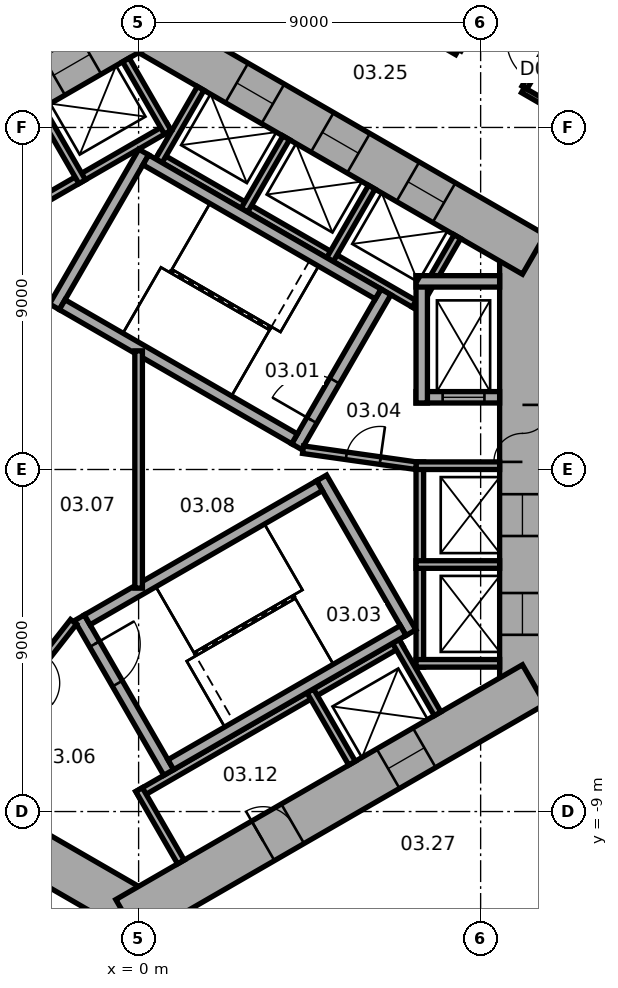
"""IFC4 building model, lengths in metres.
Left out: names, types, materials, properties, quantities, classifications, styles, units other than length and angle.
Written with IfcOpenShell. Run it as: python <this file> out.ifc"""

import sys

from ifc_helpers import new_model, si_unit, direction, frame, frame_2d, origin, place, context, subcontext, project, spatial, rectangle, extrude, element, fill, save


model = new_model("IFC4")
c1 = context("Model", 3, precision=1e-05, world=origin(), true_north=direction((0.0, 1.0)))
c2 = subcontext(c1, "Body", "Model", "MODEL_VIEW")
j1 = project(units=[si_unit("LENGTHUNIT", "METRE"), si_unit("PLANEANGLEUNIT", "RADIAN")], contexts=[c1])
p1 = place(None, origin())
s1 = spatial("IfcSite", under=j1, at=p1, CompositionType="ELEMENT")
p2 = place(p1, origin())
s2 = spatial("IfcBuilding", under=s1, at=p2, CompositionType="ELEMENT")
p3 = place(p2, frame((0.0, 0.0, 21.0)))
s3 = spatial("IfcBuildingStorey", under=s2, at=p3, CompositionType="ELEMENT", Elevation=21.0)
p4 = place(p3, frame((10.1, -6.177, 0.0), z_axis=(0.0, 0.0, 1.0), x_axis=(0.0, 1.0, 0.0)))
e1 = element("IfcWall", 1, at=p4, inside=s3, PredefinedType="SHEAR", context=c2, shape_type="SweptSolid", body=[
    extrude(rectangle(XDim=12.355, YDim=1.2, at=frame_2d((6.177, 0.0))), origin(), (0.0, 0.0, 1.0), 8.0),
])
p5 = place(p4, frame((6.378, 0.0, 0.0)))
e2 = element("IfcOpeningElement", 2, at=p5, cuts=e1, PredefinedType="OPENING", context=c2, shape_type="SweptSolid", body=[
    extrude(rectangle(XDim=1.5, YDim=2.1, at=frame_2d((0.75, 1.05))), frame((0.0, 0.61, 0.0), z_axis=(0.0, -1.0, 0.0), x_axis=(1.0, 0.0, 0.0)), (0.0, 0.0, 1.0), 1.22),
])
p6 = place(p4, frame((1.828, 0.0, 0.0)))
e3 = element("IfcOpeningElement", 3, at=p6, cuts=e1, PredefinedType="OPENING", context=c2, shape_type="SweptSolid", body=[
    extrude(rectangle(XDim=1.1, YDim=2.1, at=frame_2d((0.55, 1.05))), frame((0.0, 0.61, 0.0), z_axis=(0.0, -1.0, 0.0), x_axis=(1.0, 0.0, 0.0)), (0.0, 0.0, 1.0), 1.22),
])
p7 = place(p4, frame((4.427, 0.0, 0.0)))
e4 = element("IfcOpeningElement", 4, at=p7, cuts=e1, PredefinedType="OPENING", context=c2, shape_type="SweptSolid", body=[
    extrude(rectangle(XDim=1.1, YDim=2.1, at=frame_2d((0.55, 1.05))), frame((0.0, 0.61, 0.0), z_axis=(0.0, -1.0, 0.0), x_axis=(1.0, 0.0, 0.0)), (0.0, 0.0, 1.0), 1.22),
])
p8 = place(p3, frame((10.4, 5.658, 0.0), z_axis=(0.0, 0.0, 1.0), x_axis=(-0.866021384402, 0.500006961711, 0.0)))
e5 = element("IfcWall", 5, at=p8, inside=s3, PredefinedType="SHEAR", context=c2, shape_type="SweptSolid", body=[
    extrude(rectangle(XDim=12.355, YDim=1.2, at=frame_2d((6.178, 0.0))), origin(), (0.0, 0.0, 1.0), 8.0),
])
p9 = place(p8, frame((2.728, 0.0, 0.0)))
e6 = element("IfcOpeningElement", 6, at=p9, cuts=e5, PredefinedType="OPENING", context=c2, shape_type="SweptSolid", body=[
    extrude(rectangle(XDim=1.1, YDim=2.1, at=frame_2d((0.55, 1.05))), frame((0.0, 0.61, 0.0), z_axis=(0.0, -1.0, 0.0), x_axis=(1.0, 0.0, 0.0)), (0.0, 0.0, 1.0), 1.22),
])
p10 = place(p8, frame((5.328, 0.0, 0.0)))
e7 = element("IfcOpeningElement", 7, at=p10, cuts=e5, PredefinedType="OPENING", context=c2, shape_type="SweptSolid", body=[
    extrude(rectangle(XDim=1.1, YDim=2.1, at=frame_2d((0.55, 1.05))), frame((0.0, 0.61, 0.0), z_axis=(0.0, -1.0, 0.0), x_axis=(1.0, 0.0, 0.0)), (0.0, 0.0, 1.0), 1.22),
])
p11 = place(p8, frame((7.928, 0.0, 0.0)))
e8 = element("IfcOpeningElement", 8, at=p11, cuts=e5, PredefinedType="OPENING", context=c2, shape_type="SweptSolid", body=[
    extrude(rectangle(XDim=1.1, YDim=2.1, at=frame_2d((0.55, 1.05))), frame((0.0, 0.61, 0.0), z_axis=(0.0, -1.0, 0.0), x_axis=(1.0, 0.0, 0.0)), (0.0, 0.0, 1.0), 1.22),
])
p12 = place(p3, frame((0.3, 11.836, 0.0), z_axis=(0.0, 0.0, 1.0), x_axis=(-0.866021384402, -0.500006961711, 0.0)))
e9 = element("IfcWall", 9, at=p12, inside=s3, PredefinedType="SHEAR", context=c2, shape_type="SweptSolid", body=[
    extrude(rectangle(XDim=12.355, YDim=1.2, at=frame_2d((6.178, 0.0))), origin(), (0.0, 0.0, 1.0), 8.0),
])
p13 = place(p12, frame((6.378, 0.0, 0.0)))
e10 = element("IfcOpeningElement", 10, at=p13, cuts=e9, PredefinedType="OPENING", context=c2, shape_type="SweptSolid", body=[
    extrude(rectangle(XDim=1.5, YDim=2.1, at=frame_2d((0.75, 1.05))), frame((0.0, 0.61, 0.0), z_axis=(0.0, -1.0, 0.0), x_axis=(1.0, 0.0, 0.0)), (0.0, 0.0, 1.0), 1.22),
])
p14 = place(p12, frame((1.828, 0.0, 0.0)))
e11 = element("IfcOpeningElement", 11, at=p14, cuts=e9, PredefinedType="OPENING", context=c2, shape_type="SweptSolid", body=[
    extrude(rectangle(XDim=1.1, YDim=2.1, at=frame_2d((0.55, 1.05))), frame((0.0, 0.61, 0.0), z_axis=(0.0, -1.0, 0.0), x_axis=(1.0, 0.0, 0.0)), (0.0, 0.0, 1.0), 1.22),
])
p15 = place(p3, frame((-10.4, -5.658, 0.0), z_axis=(0.0, 0.0, 1.0), x_axis=(0.866021384402, -0.500006961711, 0.0)))
e12 = element("IfcWall", 12, at=p15, inside=s3, PredefinedType="SHEAR", context=c2, shape_type="SweptSolid", body=[
    extrude(rectangle(XDim=12.355, YDim=1.2, at=frame_2d((6.178, 0.0))), origin(), (0.0, 0.0, 1.0), 8.0),
])
p16 = place(p15, frame((6.378, 0.0, 0.0)))
e13 = element("IfcOpeningElement", 13, at=p16, cuts=e12, PredefinedType="OPENING", context=c2, shape_type="SweptSolid", body=[
    extrude(rectangle(XDim=1.5, YDim=2.1, at=frame_2d((0.75, 1.05))), frame((0.0, 0.61, 0.0), z_axis=(0.0, -1.0, 0.0), x_axis=(1.0, 0.0, 0.0)), (0.0, 0.0, 1.0), 1.22),
])
p17 = place(p15, frame((3.228, 0.0, 0.0)))
e14 = element("IfcOpeningElement", 14, at=p17, cuts=e12, PredefinedType="OPENING", context=c2, shape_type="SweptSolid", body=[
    extrude(rectangle(XDim=0.9, YDim=2.1, at=frame_2d((0.45, 1.05))), frame((0.0, 0.61, 0.0), z_axis=(0.0, -1.0, 0.0), x_axis=(1.0, 0.0, 0.0)), (0.0, 0.0, 1.0), 1.22),
])
p18 = place(p3, frame((-0.3, -11.836, 0.0), z_axis=(0.0, 0.0, 1.0), x_axis=(0.866021384402, 0.500006961711, 0.0)))
e15 = element("IfcWall", 15, at=p18, inside=s3, PredefinedType="SHEAR", context=c2, shape_type="SweptSolid", body=[
    extrude(rectangle(XDim=12.355, YDim=1.2, at=frame_2d((6.178, 0.0))), origin(), (0.0, 0.0, 1.0), 8.0),
])
p19 = place(p18, frame((4.128, 0.0, 0.0)))
e16 = element("IfcOpeningElement", 16, at=p19, cuts=e15, PredefinedType="OPENING", context=c2, shape_type="SweptSolid", body=[
    extrude(rectangle(XDim=0.9, YDim=2.1, at=frame_2d((0.45, 1.05))), frame((0.0, 0.61, 0.0), z_axis=(0.0, -1.0, 0.0), x_axis=(1.0, 0.0, 0.0)), (0.0, 0.0, 1.0), 1.22),
])
p20 = place(p18, frame((7.928, 0.0, 0.0)))
e17 = element("IfcOpeningElement", 17, at=p20, cuts=e15, PredefinedType="OPENING", context=c2, shape_type="SweptSolid", body=[
    extrude(rectangle(XDim=1.1, YDim=2.1, at=frame_2d((0.55, 1.05))), frame((0.0, 0.61, 0.0), z_axis=(0.0, -1.0, 0.0), x_axis=(1.0, 0.0, 0.0)), (0.0, 0.0, 1.0), 1.22),
])
p21 = place(p3, frame((7.4, -5.2, 0.0), z_axis=(0.0, 0.0, 1.0), x_axis=(0.0, 1.0, 0.0)))
e18 = element("IfcWall", 18, at=p21, inside=s3, PredefinedType="PARTITIONING", context=c2, shape_type="SweptSolid", body=[
    extrude(rectangle(XDim=5.4, YDim=0.2, at=frame_2d((2.7, 0.0))), origin(), (0.0, 0.0, 1.0), 7.7),
])
for number, where, z_axis, x_axis in (
    (19, (7.3, -5.1, 0.0), (0.0, 0.0, 1.0), (1.0, 0.0, 0.0)),
    (20, (7.3, -2.5, 0.0), (0.0, 0.0, 1.0), (1.0, 0.0, 0.0)),
    (21, (7.3, 0.1, 0.0), (0.0, 0.0, 1.0), (1.0, 0.0, 0.0)),
):
    element("IfcWall", number, at=place(p3, frame(where, z_axis=z_axis, x_axis=x_axis)), inside=s3, PredefinedType="PARTITIONING", context=c2, shape_type="SweptSolid", body=[
        extrude(rectangle(XDim=2.2, YDim=0.2, at=frame_2d((1.1, 0.0))), origin(), (0.0, 0.0, 1.0), 7.7),
    ])
p22 = place(p3, frame((7.424, 4.259, 0.0), z_axis=(0.0, 0.0, 1.0), x_axis=(-0.866026010844, 0.49999894854, 0.0)))
e22 = element("IfcWall", 22, at=p22, inside=s3, PredefinedType="PARTITIONING", context=c2, shape_type="SweptSolid", body=[
    extrude(rectangle(XDim=8.0, YDim=0.2, at=frame_2d((4.0, 0.0))), origin(), (0.0, 0.0, 1.0), 7.7),
])
for number, where, z_axis, x_axis in (
    (23, (7.287, 4.222, 0.0), (0.0, 0.0, 1.0), (0.5, 0.866, 0.0)),
    (24, (5.036, 5.522, 0.0), (0.0, 0.0, 1.0), (0.5, 0.866, 0.0)),
    (25, (2.784, 6.822, 0.0), (0.0, 0.0, 1.0), (0.5, 0.866, 0.0)),
    (26, (0.532, 8.122, 0.0), (0.0, 0.0, 1.0), (0.5, 0.866, 0.0)),
):
    element("IfcWall", number, at=place(p3, frame(where, z_axis=z_axis, x_axis=x_axis)), inside=s3, PredefinedType="PARTITIONING", context=c2, shape_type="SweptSolid", body=[
        extrude(rectangle(XDim=2.2, YDim=0.2, at=frame_2d((1.1, 0.0))), origin(), (0.0, 0.0, 1.0), 7.7),
    ])
p23 = place(p3, frame((0.803, 9.009, 0.0), z_axis=(0.0, 0.0, 1.0), x_axis=(-0.866028230842, -0.499995103361, 0.0)))
e27 = element("IfcWall", 27, at=p23, inside=s3, PredefinedType="PARTITIONING", context=c2, shape_type="SweptSolid", body=[
    extrude(rectangle(XDim=5.4, YDim=0.2, at=frame_2d((2.7, 0.0))), origin(), (0.0, 0.0, 1.0), 7.7),
])
p24 = place(p3, frame((0.767, 8.872, 0.0), z_axis=(0.0, 0.0, 1.0), x_axis=(-0.499994660107, 0.866028486751, 0.0)))
e28 = element("IfcWall", 28, at=p24, inside=s3, PredefinedType="PARTITIONING", context=c2, shape_type="SweptSolid", body=[
    extrude(rectangle(XDim=2.2, YDim=0.2, at=frame_2d((1.1, 0.0))), origin(), (0.0, 0.0, 1.0), 7.7),
])
p25 = place(p3, frame((-1.485, 7.572, 0.0), z_axis=(0.0, 0.0, 1.0), x_axis=(-0.50002983664, 0.866008176907, 0.0)))
e29 = element("IfcWall", 29, at=p25, inside=s3, PredefinedType="PARTITIONING", context=c2, shape_type="SweptSolid", body=[
    extrude(rectangle(XDim=2.2, YDim=0.2, at=frame_2d((1.1, 0.0))), origin(), (0.0, 0.0, 1.0), 7.7),
])
p26 = place(p3, frame((-0.024, -8.559, 0.0), z_axis=(0.0, 0.0, 1.0), x_axis=(0.866026010844, 0.49999894854, 0.0)))
e30 = element("IfcWall", 30, at=p26, inside=s3, PredefinedType="PARTITIONING", context=c2, shape_type="SweptSolid", body=[
    extrude(rectangle(XDim=8.0, YDim=0.2, at=frame_2d((4.0, 0.0))), origin(), (0.0, 0.0, 1.0), 7.7),
])
for number, where, z_axis, x_axis in (
    (31, (0.013, -8.422, 0.0), (0.0, 0.0, 1.0), (0.5, -0.866, 0.0)),
    (32, (4.516, -5.822, 0.0), (0.0, 0.0, 1.0), (0.5, -0.866, 0.0)),
    (33, (6.768, -4.522, 0.0), (0.0, 0.0, 1.0), (0.5, -0.866, 0.0)),
):
    element("IfcWall", number, at=place(p3, frame(where, z_axis=z_axis, x_axis=x_axis)), inside=s3, PredefinedType="PARTITIONING", context=c2, shape_type="SweptSolid", body=[
        extrude(rectangle(XDim=2.2, YDim=0.2, at=frame_2d((1.1, 0.0))), origin(), (0.0, 0.0, 1.0), 7.7),
    ])
p27 = place(p3, frame((4.158, 0.602, 0.0), z_axis=(0.0, 0.0, 1.0), x_axis=(0.499977259774, 0.866038532462, 0.0)))
e34 = element("IfcWall", 34, at=p27, inside=s3, PredefinedType="SHEAR", context=c2, shape_type="SweptSolid", body=[
    extrude(rectangle(XDim=4.7, YDim=0.3, at=frame_2d((2.35, 0.0))), origin(), (0.0, 0.0, 1.0), 7.7),
])
p28 = place(p27, frame((0.8, 0.0, 0.0)))
e35 = element("IfcOpeningElement", 35, at=p28, cuts=e34, PredefinedType="OPENING", context=c2, shape_type="SweptSolid", body=[
    extrude(rectangle(XDim=1.2, YDim=2.1, at=frame_2d((0.6, 1.05))), frame((0.0, 0.16, 0.0), z_axis=(0.0, -1.0, 0.0), x_axis=(1.0, 0.0, 0.0)), (0.0, 0.0, 1.0), 0.32),
])
p29 = place(p3, frame((-2.216, 4.282, 0.0), z_axis=(0.0, 0.0, 1.0), x_axis=(0.499977259774, 0.866038532462, 0.0)))
e36 = element("IfcWall", 36, at=p29, inside=s3, PredefinedType="SHEAR", context=c2, shape_type="SweptSolid", body=[
    extrude(rectangle(XDim=4.7, YDim=0.3, at=frame_2d((2.35, 0.0))), origin(), (0.0, 0.0, 1.0), 7.7),
])
for number, where, z_axis, x_axis in (
    (37, (4.103, 0.807, 0.0), (0.0, 0.0, 1.0), (-0.866, 0.5, 0.0)),
    (38, (6.303, 4.617, 0.0), (0.0, 0.0, 1.0), (-0.866, 0.5, 0.0)),
):
    element("IfcWall", number, at=place(p3, frame(where, z_axis=z_axis, x_axis=x_axis)), inside=s3, PredefinedType="SHEAR", context=c2, shape_type="SweptSolid", body=[
        extrude(rectangle(XDim=7.06, YDim=0.3, at=frame_2d((3.53, 0.0))), origin(), (0.0, 0.0, 1.0), 7.7),
    ])
p30 = place(p3, frame((-1.558, -3.902, 0.0), z_axis=(0.0, 0.0, 1.0), x_axis=(0.499977259774, -0.866038532462, 0.0)))
e39 = element("IfcWall", 39, at=p30, inside=s3, PredefinedType="SHEAR", context=c2, shape_type="SweptSolid", body=[
    extrude(rectangle(XDim=4.7, YDim=0.3, at=frame_2d((2.35, 0.0))), origin(), (0.0, 0.0, 1.0), 7.7),
])
p31 = place(p30, frame((0.8, 0.0, 0.0)))
e40 = element("IfcOpeningElement", 40, at=p31, cuts=e39, PredefinedType="OPENING", context=c2, shape_type="SweptSolid", body=[
    extrude(rectangle(XDim=1.2, YDim=2.1, at=frame_2d((0.6, 1.05))), frame((0.0, 0.16, 0.0), z_axis=(0.0, -1.0, 0.0), x_axis=(1.0, 0.0, 0.0)), (0.0, 0.0, 1.0), 0.32),
])
p32 = place(p3, frame((4.816, -0.222, 0.0), z_axis=(0.0, 0.0, 1.0), x_axis=(0.499977259774, -0.866038532462, 0.0)))
e41 = element("IfcWall", 41, at=p32, inside=s3, PredefinedType="SHEAR", context=c2, shape_type="SweptSolid", body=[
    extrude(rectangle(XDim=4.7, YDim=0.3, at=frame_2d((2.35, 0.0))), origin(), (0.0, 0.0, 1.0), 7.7),
])
for number, where, z_axis, x_axis in (
    (42, (-1.353, -3.957, 0.0), (0.0, 0.0, 1.0), (0.866, 0.5, 0.0)),
    (43, (0.847, -7.767, 0.0), (0.0, 0.0, 1.0), (0.866, 0.5, 0.0)),
):
    element("IfcWall", number, at=place(p3, frame(where, z_axis=z_axis, x_axis=x_axis)), inside=s3, PredefinedType="SHEAR", context=c2, shape_type="SweptSolid", body=[
        extrude(rectangle(XDim=7.06, YDim=0.3, at=frame_2d((3.53, 0.0))), origin(), (0.0, 0.0, 1.0), 7.7),
    ])
p33 = place(p3, frame((7.3, 1.9, 0.0), z_axis=(0.0, 0.0, 1.0), x_axis=(1.0, 0.0, 0.0)))
e44 = element("IfcWall", 44, at=p33, inside=s3, PredefinedType="SHEAR", context=c2, shape_type="SweptSolid", body=[
    extrude(rectangle(XDim=2.2, YDim=0.3, at=frame_2d((1.1, 0.0))), origin(), (0.0, 0.0, 1.0), 7.7),
])
p34 = place(p33, frame((0.7, 0.0, 0.0)))
e45 = element("IfcOpeningElement", 45, at=p34, cuts=e44, PredefinedType="OPENING", context=c2, shape_type="SweptSolid", body=[
    extrude(rectangle(XDim=1.1, YDim=2.1, at=frame_2d((0.55, 1.05))), frame((0.0, 0.16, 0.0), z_axis=(0.0, -1.0, 0.0), x_axis=(1.0, 0.0, 0.0)), (0.0, 0.0, 1.0), 0.32),
])
p35 = place(p3, frame((7.45, 1.75, 0.0), z_axis=(0.0, 0.0, 1.0), x_axis=(0.0, 1.0, 0.0)))
e46 = element("IfcWall", 46, at=p35, inside=s3, PredefinedType="SHEAR", context=c2, shape_type="SweptSolid", body=[
    extrude(rectangle(XDim=3.35, YDim=0.3, at=frame_2d((1.675, 0.0))), origin(), (0.0, 0.0, 1.0), 7.7),
])
p36 = place(p3, frame((7.3, 4.95, 0.0), z_axis=(0.0, 0.0, 1.0), x_axis=(1.0, 0.0, 0.0)))
e47 = element("IfcWall", 47, at=p36, inside=s3, PredefinedType="SHEAR", context=c2, shape_type="SweptSolid", body=[
    extrude(rectangle(XDim=2.2, YDim=0.3, at=frame_2d((1.1, 0.0))), origin(), (0.0, 0.0, 1.0), 7.7),
])
p37 = place(p3, frame((4.327, 0.521, 0.0), z_axis=(0.0, 0.0, 1.0), x_axis=(0.990124376366, -0.14019172346, 0.0)))
e48 = element("IfcWall", 48, at=p37, inside=s3, PredefinedType="PARTITIONING", context=c2, shape_type="SweptSolid", body=[
    extrude(rectangle(XDim=3.002, YDim=0.2, at=frame_2d((1.501, 0.0))), origin(), (0.0, 0.0, 1.0), 7.7),
])
p38 = place(p37, frame((1.15, 0.0, 0.0)))
e49 = element("IfcOpeningElement", 49, at=p38, cuts=e48, PredefinedType="OPENING", context=c2, shape_type="SweptSolid", body=[
    extrude(rectangle(XDim=0.9, YDim=2.1, at=frame_2d((0.45, 1.05))), frame((0.0, 0.11, 0.0), z_axis=(0.0, -1.0, 0.0), x_axis=(1.0, 0.0, 0.0)), (0.0, 0.0, 1.0), 0.22),
])
p39 = place(p3, frame((-1.712, -4.008, 0.0), z_axis=(0.0, 0.0, 1.0), x_axis=(-0.616549420702, -0.787316208287, 0.0)))
e50 = element("IfcWall", 50, at=p39, inside=s3, PredefinedType="PARTITIONING", context=c2, shape_type="SweptSolid", body=[
    extrude(rectangle(XDim=3.002, YDim=0.2, at=frame_2d((1.501, 0.0))), origin(), (0.0, 0.0, 1.0), 7.7),
])
p40 = place(p39, frame((1.15, 0.0, 0.0)))
e51 = element("IfcOpeningElement", 51, at=p40, cuts=e50, PredefinedType="OPENING", context=c2, shape_type="SweptSolid", body=[
    extrude(rectangle(XDim=0.9, YDim=2.1, at=frame_2d((0.45, 1.05))), frame((0.0, 0.11, 0.0), z_axis=(0.0, -1.0, 0.0), x_axis=(1.0, 0.0, 0.0)), (0.0, 0.0, 1.0), 0.22),
])
p41 = place(p3, frame((0.0, -3.122, 0.0), z_axis=(0.0, 0.0, 1.0), x_axis=(0.0, 1.0, 0.0)))
e52 = element("IfcWall", 52, at=p41, inside=s3, PredefinedType="PARTITIONING", context=c2, shape_type="SweptSolid", body=[
    extrude(rectangle(XDim=6.245, YDim=0.2, at=frame_2d((3.122, 0.0))), origin(), (0.0, 0.0, 1.0), 7.7),
])
p42 = place(p3, frame((10.114, 9.98, 0.0), z_axis=(0.0, 0.0, 1.0), x_axis=(0.865848115047, -0.500306947453, 0.0)))
e53 = element("IfcWall", 53, at=p42, inside=s3, PredefinedType="PARTITIONING", context=c2, shape_type="SweptSolid", body=[
    extrude(rectangle(XDim=0.832, YDim=0.15, at=frame_2d((0.416, 0.0))), origin(), (0.0, 0.0, 1.0), 7.7),
])
p43 = place(p3, frame((6.995, 11.781, 0.0), z_axis=(0.0, 0.0, 1.0), x_axis=(0.866076391369, -0.499911676512, 0.0)))
e54 = element("IfcWall", 54, at=p43, inside=s3, PredefinedType="PARTITIONING", context=c2, shape_type="SweptSolid", body=[
    extrude(rectangle(XDim=1.601, YDim=0.15, at=frame_2d((0.8, 0.0))), origin(), (0.0, 0.0, 1.0), 7.7),
])
p44 = place(p3, frame((13.772, 16.224, 0.0), z_axis=(0.0, 0.0, 1.0), x_axis=(-0.505547889018, -0.862798546539, 0.0)))
e55 = element("IfcWall", 55, at=p44, inside=s3, PredefinedType="PARTITIONING", context=c2, shape_type="SweptSolid", body=[
    extrude(rectangle(XDim=7.156, YDim=0.15, at=frame_2d((3.578, 0.0))), origin(), (0.0, 0.0, 1.0), 7.7),
])
p45 = place(p44, frame((5.706, 0.0, 0.0)))
e56 = element("IfcOpeningElement", 56, at=p45, cuts=e55, PredefinedType="OPENING", context=c2, shape_type="SweptSolid", body=[
    extrude(rectangle(XDim=1.2, YDim=2.1, at=frame_2d((0.6, 1.05))), frame((0.0, 0.085, 0.0), z_axis=(0.0, -1.0, 0.0), x_axis=(1.0, 0.0, 0.0)), (0.0, 0.0, 1.0), 0.17),
])
p46 = place(p5, origin())
e57 = element("IfcDoor", 57, at=p46, inside=s3, OperationType="DOUBLE_DOOR_SINGLE_SWING", PredefinedType="DOOR", context=c2, shape_type="SweptSolid", body=[
    extrude(rectangle(XDim=1.5, YDim=2.1, at=frame_2d((0.75, 1.05))), frame((0.0, 0.025, 0.0), z_axis=(0.0, -1.0, 0.0), x_axis=(1.0, 0.0, 0.0)), (0.0, 0.0, 1.0), 0.05),
])
fill(e2, e57)
p47 = place(p28, origin())
e58 = element("IfcDoor", 58, at=p47, inside=s3, OperationType="SINGLE_SWING_RIGHT", PredefinedType="DOOR", context=c2, shape_type="SweptSolid", body=[
    extrude(rectangle(XDim=1.2, YDim=2.1, at=frame_2d((0.6, 1.05))), frame((0.0, 0.025, 0.0), z_axis=(0.0, -1.0, 0.0), x_axis=(1.0, 0.0, 0.0)), (0.0, 0.0, 1.0), 0.05),
])
fill(e35, e58)
p48 = place(p31, origin())
e59 = element("IfcDoor", 59, at=p48, inside=s3, OperationType="SINGLE_SWING_RIGHT", PredefinedType="DOOR", context=c2, shape_type="SweptSolid", body=[
    extrude(rectangle(XDim=1.2, YDim=2.1, at=frame_2d((0.6, 1.05))), frame((0.0, 0.025, 0.0), z_axis=(0.0, -1.0, 0.0), x_axis=(1.0, 0.0, 0.0)), (0.0, 0.0, 1.0), 0.05),
])
fill(e40, e59)
p49 = place(p38, origin())
e60 = element("IfcDoor", 60, at=p49, inside=s3, OperationType="SINGLE_SWING_LEFT", PredefinedType="DOOR", context=c2, shape_type="SweptSolid", body=[
    extrude(rectangle(XDim=0.9, YDim=2.1, at=frame_2d((0.45, 1.05))), frame((0.0, 0.025, 0.0), z_axis=(0.0, -1.0, 0.0), x_axis=(1.0, 0.0, 0.0)), (0.0, 0.0, 1.0), 0.05),
])
fill(e49, e60)
p50 = place(p19, origin())
e61 = element("IfcDoor", 61, at=p50, inside=s3, OperationType="SINGLE_SWING_LEFT", PredefinedType="DOOR", context=c2, shape_type="SweptSolid", body=[
    extrude(rectangle(XDim=0.9, YDim=2.1, at=frame_2d((0.45, 1.05))), frame((0.0, 0.025, 0.0), z_axis=(0.0, -1.0, 0.0), x_axis=(1.0, 0.0, 0.0)), (0.0, 0.0, 1.0), 0.05),
])
fill(e16, e61)
p51 = place(p34, origin())
e62 = element("IfcDoor", 62, at=p51, inside=s3, OperationType="DOUBLE_DOOR_SLIDING", PredefinedType="DOOR", context=c2, shape_type="SweptSolid", body=[
    extrude(rectangle(XDim=1.1, YDim=2.1, at=frame_2d((0.55, 1.05))), frame((0.0, 0.025, 0.0), z_axis=(0.0, -1.0, 0.0), x_axis=(1.0, 0.0, 0.0)), (0.0, 0.0, 1.0), 0.05),
])
fill(e45, e62)
p52 = place(p6, origin())
e63 = element("IfcDoor", 63, at=p52, inside=s3, OperationType="DOUBLE_DOOR_SLIDING", PredefinedType="DOOR", context=c2, shape_type="SweptSolid", body=[
    extrude(rectangle(XDim=1.1, YDim=2.1, at=frame_2d((0.55, 1.05))), frame((0.0, 0.025, 0.0), z_axis=(0.0, -1.0, 0.0), x_axis=(1.0, 0.0, 0.0)), (0.0, 0.0, 1.0), 0.05),
])
fill(e3, e63)
p53 = place(p7, origin())
e64 = element("IfcDoor", 64, at=p53, inside=s3, OperationType="DOUBLE_DOOR_SLIDING", PredefinedType="DOOR", context=c2, shape_type="SweptSolid", body=[
    extrude(rectangle(XDim=1.1, YDim=2.1, at=frame_2d((0.55, 1.05))), frame((0.0, 0.025, 0.0), z_axis=(0.0, -1.0, 0.0), x_axis=(1.0, 0.0, 0.0)), (0.0, 0.0, 1.0), 0.05),
])
fill(e4, e64)
p54 = place(p9, origin())
e65 = element("IfcDoor", 65, at=p54, inside=s3, OperationType="DOUBLE_DOOR_SLIDING", PredefinedType="DOOR", context=c2, shape_type="SweptSolid", body=[
    extrude(rectangle(XDim=1.1, YDim=2.1, at=frame_2d((0.55, 1.05))), frame((0.0, 0.025, 0.0), z_axis=(0.0, -1.0, 0.0), x_axis=(1.0, 0.0, 0.0)), (0.0, 0.0, 1.0), 0.05),
])
fill(e6, e65)
p55 = place(p10, origin())
e66 = element("IfcDoor", 66, at=p55, inside=s3, OperationType="DOUBLE_DOOR_SLIDING", PredefinedType="DOOR", context=c2, shape_type="SweptSolid", body=[
    extrude(rectangle(XDim=1.1, YDim=2.1, at=frame_2d((0.55, 1.05))), frame((0.0, 0.025, 0.0), z_axis=(0.0, -1.0, 0.0), x_axis=(1.0, 0.0, 0.0)), (0.0, 0.0, 1.0), 0.05),
])
fill(e7, e66)
p56 = place(p11, origin())
e67 = element("IfcDoor", 67, at=p56, inside=s3, OperationType="DOUBLE_DOOR_SLIDING", PredefinedType="DOOR", context=c2, shape_type="SweptSolid", body=[
    extrude(rectangle(XDim=1.1, YDim=2.1, at=frame_2d((0.55, 1.05))), frame((0.0, 0.025, 0.0), z_axis=(0.0, -1.0, 0.0), x_axis=(1.0, 0.0, 0.0)), (0.0, 0.0, 1.0), 0.05),
])
fill(e8, e67)
p57 = place(p14, origin())
e68 = element("IfcDoor", 68, at=p57, inside=s3, OperationType="DOUBLE_DOOR_SLIDING", PredefinedType="DOOR", context=c2, shape_type="SweptSolid", body=[
    extrude(rectangle(XDim=1.1, YDim=2.1, at=frame_2d((0.55, 1.05))), frame((0.0, 0.025, 0.0), z_axis=(0.0, -1.0, 0.0), x_axis=(1.0, 0.0, 0.0)), (0.0, 0.0, 1.0), 0.05),
])
fill(e11, e68)
p58 = place(p20, origin())
e69 = element("IfcDoor", 69, at=p58, inside=s3, OperationType="DOUBLE_DOOR_SLIDING", PredefinedType="DOOR", context=c2, shape_type="SweptSolid", body=[
    extrude(rectangle(XDim=1.1, YDim=2.1, at=frame_2d((0.55, 1.05))), frame((0.0, 0.025, 0.0), z_axis=(0.0, -1.0, 0.0), x_axis=(1.0, 0.0, 0.0)), (0.0, 0.0, 1.0), 0.05),
])
fill(e17, e69)
p59 = place(p45, origin())
e70 = element("IfcDoor", 70, at=p59, inside=s3, OperationType="SINGLE_SWING_LEFT", PredefinedType="DOOR", context=c2, shape_type="SweptSolid", body=[
    extrude(rectangle(XDim=1.2, YDim=2.1, at=frame_2d((0.6, 1.05))), frame((0.0, 0.025, 0.0), z_axis=(0.0, -1.0, 0.0), x_axis=(1.0, 0.0, 0.0)), (0.0, 0.0, 1.0), 0.05),
])
fill(e56, e70)
save(model, sys.argv[1])
